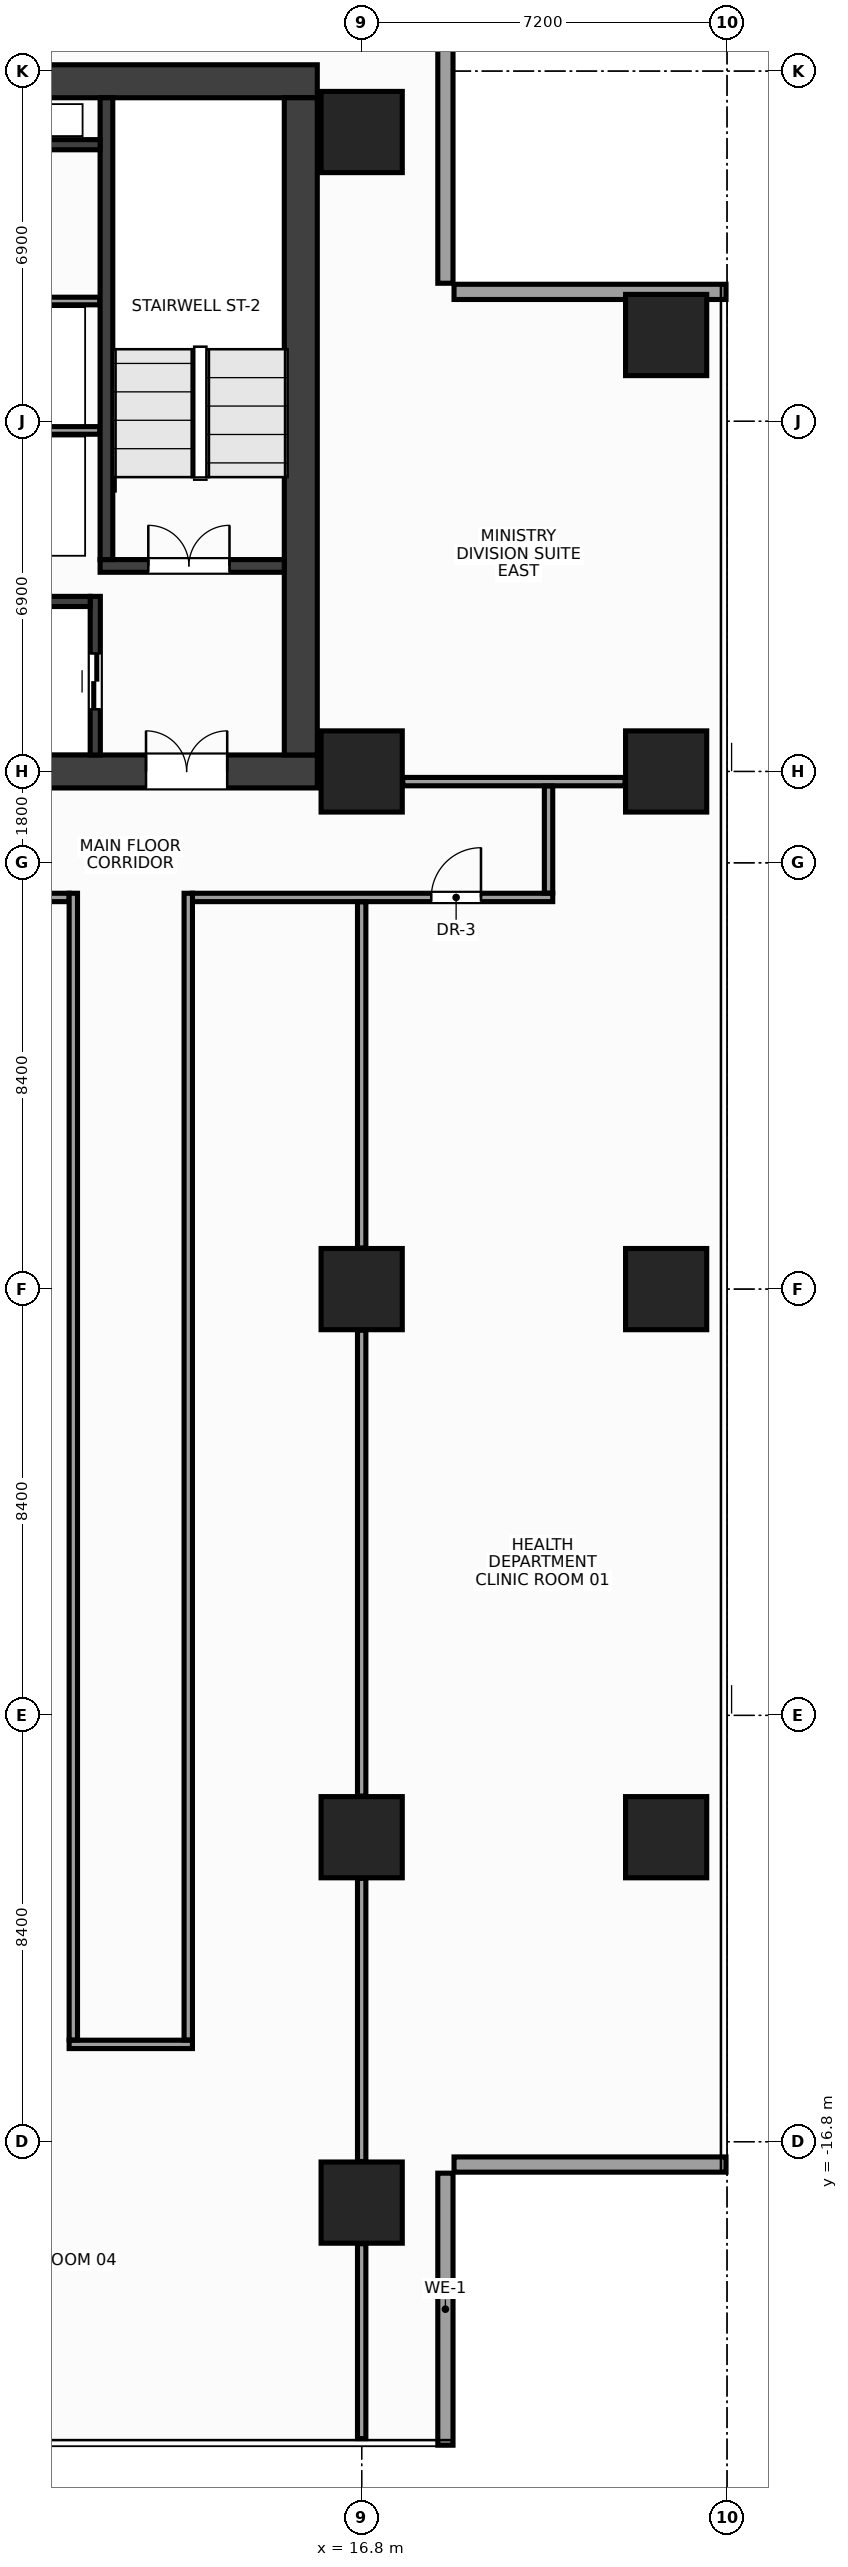
"""IFC4 building model, lengths in metres.
Left out: names, types, materials, properties, quantities, classifications, styles, units other than length and angle.
Written with IfcOpenShell. Run it as: python <this file> out.ifc"""

import sys

from ifc_helpers import new_model, si_unit, direction, frame, frame_2d, origin, origin_2d, place, context, subcontext, project, spatial, rectangle, extrude, source, transform, mapped, element, fill, save


model = new_model("IFC4")
c1 = context("Model", 3, precision=1e-05, world=origin(), true_north=direction((0.0, 1.0)))
c2 = subcontext(c1, "Body", "Model", "MODEL_VIEW")
j1 = project(units=[si_unit("LENGTHUNIT", "METRE"), si_unit("PLANEANGLEUNIT", "RADIAN")], contexts=[c1])
p1 = place(None, origin())
s1 = spatial("IfcSite", under=j1, at=p1, CompositionType="ELEMENT")
p2 = place(p1, origin())
s2 = spatial("IfcBuilding", under=s1, at=p2, CompositionType="ELEMENT")
p3 = place(p2, frame((0.0, 0.0, 160.4)))
s3 = spatial("IfcBuildingStorey", under=s2, at=p3, CompositionType="ELEMENT", Elevation=160.4)
m1 = source(origin(), c2, "Body", "SweptSolid", [
    extrude(rectangle(XDim=31.85, YDim=0.65, at=frame_2d((15.925, 0.0))), origin(), (0.0, 0.0, 1.0), 3.6),
])
p4 = place(p3, frame((-15.925, 23.8, 0.0), z_axis=(0.0, 0.0, 1.0), x_axis=(1.0, 0.0, 0.0)))
e1 = element("IfcWall", 1, at=p4, inside=s3, PredefinedType="SHEAR", context=c2, shape_type="MappedRepresentation", body=[
    mapped(m1, transform((0.0, 0.0, 0.0), x_axis=(1.0, 0.0, 0.0), y_axis=(0.0, 1.0, 0.0), z_axis=(0.0, 0.0, 1.0), scale=1.0)),
])
p5 = place(p3, frame((-15.925, 10.2, 0.0), z_axis=(0.0, 0.0, 1.0), x_axis=(1.0, 0.0, 0.0)))
e2 = element("IfcWall", 2, at=p5, inside=s3, PredefinedType="SHEAR", context=c2, shape_type="MappedRepresentation", body=[
    mapped(m1, transform((0.0, 0.0, 0.0), x_axis=(1.0, 0.0, 0.0), y_axis=(0.0, 1.0, 0.0), z_axis=(0.0, 0.0, 1.0), scale=1.0)),
])
p6 = place(p5, frame((1.775, 0.0, 0.0)))
e3 = element("IfcOpeningElement", 3, at=p6, cuts=e2, PredefinedType="OPENING", context=c2, shape_type="SweptSolid", body=[
    extrude(rectangle(XDim=1.6, YDim=2.15, at=frame_2d((0.8, 1.075))), frame((0.0, 0.337, 0.0), z_axis=(0.0, -1.0, 0.0), x_axis=(1.0, 0.0, 0.0)), (0.0, 0.0, 1.0), 0.674),
])
p7 = place(p5, frame((28.475, 0.0, 0.0)))
e4 = element("IfcOpeningElement", 4, at=p7, cuts=e2, PredefinedType="OPENING", context=c2, shape_type="SweptSolid", body=[
    extrude(rectangle(XDim=1.6, YDim=2.15, at=frame_2d((0.8, 1.075))), frame((0.0, 0.337, 0.0), z_axis=(0.0, -1.0, 0.0), x_axis=(1.0, 0.0, 0.0)), (0.0, 0.0, 1.0), 0.674),
])
p8 = place(p5, frame((15.175, 0.0, 0.0)))
e5 = element("IfcOpeningElement", 5, at=p8, cuts=e2, PredefinedType="OPENING", context=c2, shape_type="SweptSolid", body=[
    extrude(rectangle(XDim=1.5, YDim=2.2, at=frame_2d((0.75, 1.1))), frame((0.0, 0.337, 0.0), z_axis=(0.0, -1.0, 0.0), x_axis=(1.0, 0.0, 0.0)), (0.0, 0.0, 1.0), 0.674),
])
m2 = source(origin(), c2, "Body", "SweptSolid", [
    extrude(rectangle(XDim=12.95, YDim=0.65, at=frame_2d((6.475, 0.0))), origin(), (0.0, 0.0, 1.0), 3.6),
])
p9 = place(p3, frame((15.6, 10.525, 0.0), z_axis=(0.0, 0.0, 1.0), x_axis=(0.0, 1.0, 0.0)))
e6 = element("IfcWall", 6, at=p9, inside=s3, PredefinedType="SHEAR", context=c2, shape_type="MappedRepresentation", body=[
    mapped(m2, transform((0.0, 0.0, 0.0), x_axis=(1.0, 0.0, 0.0), y_axis=(0.0, 1.0, 0.0), z_axis=(0.0, 0.0, 1.0), scale=1.0)),
])
m3 = source(origin(), c2, "Body", "SweptSolid", [
    extrude(rectangle(XDim=3.63, YDim=0.25, at=frame_2d((1.815, 0.0))), origin(), (0.0, 0.0, 1.0), 3.6),
])
p10 = place(p3, frame((11.645, 14.25, 0.0), z_axis=(0.0, 0.0, 1.0), x_axis=(1.0, 0.0, 0.0)))
e7 = element("IfcWall", 7, at=p10, inside=s3, PredefinedType="SHEAR", context=c2, shape_type="MappedRepresentation", body=[
    mapped(m3, transform((0.0, 0.0, 0.0), x_axis=(1.0, 0.0, 0.0), y_axis=(0.0, 1.0, 0.0), z_axis=(0.0, 0.0, 1.0), scale=1.0)),
])
p11 = place(p10, frame((0.95, 0.0, 0.0)))
e8 = element("IfcOpeningElement", 8, at=p11, cuts=e7, PredefinedType="OPENING", context=c2, shape_type="SweptSolid", body=[
    extrude(rectangle(XDim=1.6, YDim=2.15, at=frame_2d((0.8, 1.075))), frame((0.0, 0.137, 0.0), z_axis=(0.0, -1.0, 0.0), x_axis=(1.0, 0.0, 0.0)), (0.0, 0.0, 1.0), 0.274),
])
m4 = source(origin(), c2, "Body", "SweptSolid", [
    extrude(rectangle(XDim=9.1, YDim=0.25, at=frame_2d((4.55, 0.0))), origin(), (0.0, 0.0, 1.0), 3.6),
])
p12 = place(p3, frame((11.77, 14.375, 0.0), z_axis=(0.0, 0.0, 1.0), x_axis=(0.0, 1.0, 0.0)))
e9 = element("IfcWall", 9, at=p12, inside=s3, PredefinedType="SHEAR", context=c2, shape_type="MappedRepresentation", body=[
    mapped(m4, transform((0.0, 0.0, 0.0), x_axis=(1.0, 0.0, 0.0), y_axis=(0.0, 1.0, 0.0), z_axis=(0.0, 0.0, 1.0), scale=1.0)),
])
m5 = source(origin(), c2, "Body", "SweptSolid", [
    extrude(rectangle(XDim=3.125, YDim=0.2, at=frame_2d((1.562, 0.0))), origin(), (0.0, 0.0, 1.0), 3.6),
])
p13 = place(p3, frame((11.55, 10.525, 0.0), z_axis=(0.0, 0.0, 1.0), x_axis=(0.0, 1.0, 0.0)))
e10 = element("IfcWall", 10, at=p13, inside=s3, PredefinedType="SHEAR", context=c2, shape_type="MappedRepresentation", body=[
    mapped(m5, transform((0.0, 0.0, 0.0), x_axis=(1.0, 0.0, 0.0), y_axis=(0.0, 1.0, 0.0), z_axis=(0.0, 0.0, 1.0), scale=1.0)),
])
p14 = place(p13, frame((0.9, 0.0, 0.0)))
e11 = element("IfcOpeningElement", 11, at=p14, cuts=e10, PredefinedType="OPENING", context=c2, shape_type="SweptSolid", body=[
    extrude(rectangle(XDim=1.1, YDim=2.15, at=frame_2d((0.55, 1.075))), frame((0.0, 0.112, 0.0), z_axis=(0.0, -1.0, 0.0), x_axis=(1.0, 0.0, 0.0)), (0.0, 0.0, 1.0), 0.224),
])
m6 = source(origin(), c2, "Body", "SweptSolid", [
    extrude(rectangle(XDim=2.825, YDim=0.2, at=frame_2d((1.413, 0.0))), origin(), (0.0, 0.0, 1.0), 3.6),
])
p15 = place(p3, frame((8.625, 13.55, 0.0), z_axis=(0.0, 0.0, 1.0), x_axis=(1.0, 0.0, 0.0)))
e12 = element("IfcWall", 12, at=p15, inside=s3, PredefinedType="SHEAR", context=c2, shape_type="MappedRepresentation", body=[
    mapped(m6, transform((0.0, 0.0, 0.0), x_axis=(1.0, 0.0, 0.0), y_axis=(0.0, 1.0, 0.0), z_axis=(0.0, 0.0, 1.0), scale=1.0)),
])
m7 = source(origin(), c2, "Body", "SweptSolid", [
    extrude(rectangle(XDim=3.02, YDim=0.2, at=frame_2d((1.51, 0.0))), origin(), (0.0, 0.0, 1.0), 3.6),
])
p16 = place(p3, frame((8.625, 22.55, 0.0), z_axis=(0.0, 0.0, 1.0), x_axis=(1.0, 0.0, 0.0)))
e13 = element("IfcWall", 13, at=p16, inside=s3, PredefinedType="SHEAR", context=c2, shape_type="MappedRepresentation", body=[
    mapped(m7, transform((0.0, 0.0, 0.0), x_axis=(1.0, 0.0, 0.0), y_axis=(0.0, 1.0, 0.0), z_axis=(0.0, 0.0, 1.0), scale=1.0)),
])
m8 = source(origin(), c2, "Body", "SweptSolid", [
    extrude(rectangle(XDim=1.6, YDim=1.6, at=origin_2d()), origin(), (0.0, 0.0, 1.0), 3.6),
])
for number, where, z_axis, x_axis in (
    (14, (16.8, -18.0, 0.0), (0.0, 0.0, 1.0), (1.0, 0.0, 0.0)),
    (15, (16.8, -10.8, 0.0), (0.0, 0.0, 1.0), (1.0, 0.0, 0.0)),
    (16, (16.8, 0.0, 0.0), (0.0, 0.0, 1.0), (1.0, 0.0, 0.0)),
    (17, (16.8, 10.2, 0.0), (0.0, 0.0, 1.0), (1.0, 0.0, 0.0)),
    (18, (16.8, 22.8, 0.0), (0.0, 0.0, 1.0), (1.0, 0.0, 0.0)),
    (19, (22.8, -10.8, 0.0), (0.0, 0.0, 1.0), (1.0, 0.0, 0.0)),
    (20, (22.8, 0.0, 0.0), (0.0, 0.0, 1.0), (1.0, 0.0, 0.0)),
    (21, (22.8, 10.2, 0.0), (0.0, 0.0, 1.0), (1.0, 0.0, 0.0)),
    (22, (22.8, 18.8, 0.0), (0.0, 0.0, 1.0), (1.0, 0.0, 0.0)),
):
    element("IfcColumn", number, at=place(p3, frame(where, z_axis=z_axis, x_axis=x_axis)), inside=s3, PredefinedType="COLUMN", context=c2, shape_type="MappedRepresentation", body=[
        mapped(m8, transform((0.0, 0.0, 0.0), x_axis=(1.0, 0.0, 0.0), y_axis=(0.0, 1.0, 0.0), z_axis=(0.0, 0.0, 1.0), scale=1.0)),
    ])
m9 = source(origin(), c2, "Body", "SweptSolid", [
    extrude(rectangle(XDim=5.36, YDim=0.3, at=frame_2d((2.68, 0.0))), origin(), (0.0, 0.0, 1.0), 2.76),
])
p17 = place(p3, frame((18.45, -22.78, 0.0), z_axis=(0.0, 0.0, 1.0), x_axis=(0.0, 1.0, 0.0)))
e23 = element("IfcWall", 23, at=p17, inside=s3, PredefinedType="STANDARD", context=c2, shape_type="MappedRepresentation", body=[
    mapped(m9, transform((0.0, 0.0, 0.0), x_axis=(1.0, 0.0, 0.0), y_axis=(0.0, 1.0, 0.0), z_axis=(0.0, 0.0, 1.0), scale=1.0)),
])
m10 = source(origin(), c2, "Body", "SweptSolid", [
    extrude(rectangle(XDim=5.36, YDim=0.3, at=frame_2d((2.68, 0.0))), origin(), (0.0, 0.0, 1.0), 2.76),
])
for number, where, z_axis, x_axis in (
    (24, (18.62, -17.25, 0.0), (0.0, 0.0, 1.0), (1.0, 0.0, 0.0)),
    (25, (23.98, 19.65, 0.0), (0.0, 0.0, 1.0), (-1.0, 0.0, 0.0)),
    (26, (18.45, 19.82, 0.0), (0.0, 0.0, 1.0), (0.0, 1.0, 0.0)),
):
    element("IfcWall", number, at=place(p3, frame(where, z_axis=z_axis, x_axis=x_axis)), inside=s3, PredefinedType="STANDARD", context=c2, shape_type="MappedRepresentation", body=[
        mapped(m10, transform((0.0, 0.0, 0.0), x_axis=(1.0, 0.0, 0.0), y_axis=(0.0, 1.0, 0.0), z_axis=(0.0, 0.0, 1.0), scale=1.0)),
    ])
m11 = source(origin(), c2, "Body", "SweptSolid", [
    extrude(rectangle(XDim=3.01, YDim=0.15, at=frame_2d((1.505, 0.0))), origin(), (0.0, 0.0, 1.0), 3.38),
])
for number, where, z_axis, x_axis in (
    (27, (8.63, 16.92, 0.0), (0.0, 0.0, 1.0), (1.0, 0.0, 0.0)),
    (28, (8.63, 19.47, 0.0), (0.0, 0.0, 1.0), (1.0, 0.0, 0.0)),
):
    element("IfcWall", number, at=place(p3, frame(where, z_axis=z_axis, x_axis=x_axis)), inside=s3, PredefinedType="PARTITIONING", context=c2, shape_type="MappedRepresentation", body=[
        mapped(m11, transform((0.0, 0.0, 0.0), x_axis=(1.0, 0.0, 0.0), y_axis=(0.0, 1.0, 0.0), z_axis=(0.0, 0.0, 1.0), scale=1.0)),
    ])
m12 = source(origin(), c2, "Body", "SweptSolid", [
    extrude(rectangle(XDim=4.38, YDim=0.165, at=frame_2d((2.19, 0.0))), origin(), (0.0, 0.0, 1.0), 2.915),
])
p18 = place(p3, frame((17.61, 10.0, 0.0), z_axis=(0.0, 0.0, 1.0), x_axis=(1.0, 0.0, 0.0)))
e29 = element("IfcWall", 29, at=p18, inside=s3, PredefinedType="PARTITIONING", context=c2, shape_type="MappedRepresentation", body=[
    mapped(m12, transform((0.0, 0.0, 0.0), x_axis=(1.0, 0.0, 0.0), y_axis=(0.0, 1.0, 0.0), z_axis=(0.0, 0.0, 1.0), scale=1.0)),
])
m13 = source(origin(), c2, "Body", "SweptSolid", [
    extrude(rectangle(XDim=31.6, YDim=0.165, at=frame_2d((15.8, 0.0))), origin(), (0.0, 0.0, 1.0), 2.765),
])
p19 = place(p3, frame((-20.565, 7.718, 0.0), z_axis=(0.0, 0.0, 1.0), x_axis=(1.0, 0.0, 0.0)))
e30 = element("IfcWall", 30, at=p19, inside=s3, PredefinedType="PARTITIONING", context=c2, shape_type="MappedRepresentation", body=[
    mapped(m13, transform((0.0, 0.0, 0.0), x_axis=(1.0, 0.0, 0.0), y_axis=(0.0, 1.0, 0.0), z_axis=(0.0, 0.0, 1.0), scale=1.0)),
])
p20 = place(p19, frame((2.614, 0.0, 0.0)))
e31 = element("IfcOpeningElement", 31, at=p20, cuts=e30, PredefinedType="OPENING", context=c2, shape_type="SweptSolid", body=[
    extrude(rectangle(XDim=0.98, YDim=2.15, at=frame_2d((0.49, 1.075))), frame((0.0, 0.094, 0.0), z_axis=(0.0, -1.0, 0.0), x_axis=(1.0, 0.0, 0.0)), (0.0, 0.0, 1.0), 0.189),
])
p21 = place(p19, frame((15.175, 0.0, 0.0)))
e32 = element("IfcOpeningElement", 32, at=p21, cuts=e30, PredefinedType="OPENING", context=c2, shape_type="SweptSolid", body=[
    extrude(rectangle(XDim=0.98, YDim=2.15, at=frame_2d((0.49, 1.075))), frame((0.0, 0.094, 0.0), z_axis=(0.0, -1.0, 0.0), x_axis=(1.0, 0.0, 0.0)), (0.0, 0.0, 1.0), 0.189),
])
p22 = place(p19, frame((27.874, 0.0, 0.0)))
e33 = element("IfcOpeningElement", 33, at=p22, cuts=e30, PredefinedType="OPENING", context=c2, shape_type="SweptSolid", body=[
    extrude(rectangle(XDim=0.98, YDim=2.15, at=frame_2d((0.49, 1.075))), frame((0.0, 0.094, 0.0), z_axis=(0.0, -1.0, 0.0), x_axis=(1.0, 0.0, 0.0)), (0.0, 0.0, 1.0), 0.189),
])
m14 = source(origin(), c2, "Body", "SweptSolid", [
    extrude(rectangle(XDim=7.1, YDim=0.165, at=frame_2d((3.55, 0.0))), origin(), (0.0, 0.0, 1.0), 2.765),
])
p23 = place(p3, frame((13.465, 7.718, 0.0), z_axis=(0.0, 0.0, 1.0), x_axis=(1.0, 0.0, 0.0)))
e34 = element("IfcWall", 34, at=p23, inside=s3, PredefinedType="PARTITIONING", context=c2, shape_type="MappedRepresentation", body=[
    mapped(m14, transform((0.0, 0.0, 0.0), x_axis=(1.0, 0.0, 0.0), y_axis=(0.0, 1.0, 0.0), z_axis=(0.0, 0.0, 1.0), scale=1.0)),
])
p24 = place(p23, frame((4.706, 0.0, 0.0)))
e35 = element("IfcOpeningElement", 35, at=p24, cuts=e34, PredefinedType="OPENING", context=c2, shape_type="SweptSolid", body=[
    extrude(rectangle(XDim=0.98, YDim=2.15, at=frame_2d((0.49, 1.075))), frame((0.0, 0.094, 0.0), z_axis=(0.0, -1.0, 0.0), x_axis=(1.0, 0.0, 0.0)), (0.0, 0.0, 1.0), 0.189),
])
m15 = source(origin(), c2, "Body", "SweptSolid", [
    extrude(rectangle(XDim=2.43, YDim=0.165, at=frame_2d((1.215, 0.0))), origin(), (0.0, 0.0, 1.0), 3.38),
])
p25 = place(p3, frame((11.035, -14.883, 0.0), z_axis=(0.0, 0.0, 1.0), x_axis=(1.0, 0.0, 0.0)))
e36 = element("IfcWall", 36, at=p25, inside=s3, PredefinedType="PARTITIONING", context=c2, shape_type="MappedRepresentation", body=[
    mapped(m15, transform((0.0, 0.0, 0.0), x_axis=(1.0, 0.0, 0.0), y_axis=(0.0, 1.0, 0.0), z_axis=(0.0, 0.0, 1.0), scale=1.0)),
])
m16 = source(origin(), c2, "Body", "SweptSolid", [
    extrude(rectangle(XDim=2.108, YDim=0.165, at=frame_2d((1.054, 0.0))), origin(), (0.0, 0.0, 1.0), 3.38),
])
p26 = place(p3, frame((20.482, 7.805, 0.0), z_axis=(0.0, 0.0, 1.0), x_axis=(0.0, 1.0, 0.0)))
e37 = element("IfcWall", 37, at=p26, inside=s3, PredefinedType="PARTITIONING", context=c2, shape_type="MappedRepresentation", body=[
    mapped(m16, transform((0.0, 0.0, 0.0), x_axis=(1.0, 0.0, 0.0), y_axis=(0.0, 1.0, 0.0), z_axis=(0.0, 0.0, 1.0), scale=1.0)),
])
m17 = source(origin(), c2, "Body", "SweptSolid", [
    extrude(rectangle(XDim=22.595, YDim=0.165, at=frame_2d((11.297, 0.0))), origin(), (0.0, 0.0, 1.0), 2.665),
])
for number, where, z_axis, x_axis in (
    (38, (11.117, -14.795, 0.0), (0.0, 0.0, 1.0), (0.0, 1.0, 0.0)),
    (39, (13.383, -14.795, 0.0), (0.0, 0.0, 1.0), (0.0, 1.0, 0.0)),
):
    element("IfcWall", number, at=place(p3, frame(where, z_axis=z_axis, x_axis=x_axis)), inside=s3, PredefinedType="PARTITIONING", context=c2, shape_type="MappedRepresentation", body=[
        mapped(m17, transform((0.0, 0.0, 0.0), x_axis=(1.0, 0.0, 0.0), y_axis=(0.0, 1.0, 0.0), z_axis=(0.0, 0.0, 1.0), scale=1.0)),
    ])
m18 = source(origin(), c2, "Body", "SweptSolid", [
    extrude(rectangle(XDim=3.84, YDim=0.165, at=frame_2d((1.92, 0.0))), origin(), (0.0, 0.0, 1.0), 3.38),
])
p27 = place(p3, frame((16.8, -22.65, 0.0), z_axis=(0.0, 0.0, 1.0), x_axis=(0.0, 1.0, 0.0)))
e40 = element("IfcWall", 40, at=p27, inside=s3, PredefinedType="PARTITIONING", context=c2, shape_type="MappedRepresentation", body=[
    mapped(m18, transform((0.0, 0.0, 0.0), x_axis=(1.0, 0.0, 0.0), y_axis=(0.0, 1.0, 0.0), z_axis=(0.0, 0.0, 1.0), scale=1.0)),
])
m19 = source(origin(), c2, "Body", "SweptSolid", [
    extrude(rectangle(XDim=5.58, YDim=0.165, at=frame_2d((2.79, 0.0))), origin(), (0.0, 0.0, 1.0), 2.965),
])
p28 = place(p3, frame((16.8, -17.19, 0.0), z_axis=(0.0, 0.0, 1.0), x_axis=(0.0, 1.0, 0.0)))
e41 = element("IfcWall", 41, at=p28, inside=s3, PredefinedType="PARTITIONING", context=c2, shape_type="MappedRepresentation", body=[
    mapped(m19, transform((0.0, 0.0, 0.0), x_axis=(1.0, 0.0, 0.0), y_axis=(0.0, 1.0, 0.0), z_axis=(0.0, 0.0, 1.0), scale=1.0)),
])
m20 = source(origin(), c2, "Body", "SweptSolid", [
    extrude(rectangle(XDim=9.18, YDim=0.165, at=frame_2d((4.59, 0.0))), origin(), (0.0, 0.0, 1.0), 2.765),
])
p29 = place(p3, frame((16.8, -9.99, 0.0), z_axis=(0.0, 0.0, 1.0), x_axis=(0.0, 1.0, 0.0)))
e42 = element("IfcWall", 42, at=p29, inside=s3, PredefinedType="PARTITIONING", context=c2, shape_type="MappedRepresentation", body=[
    mapped(m20, transform((0.0, 0.0, 0.0), x_axis=(1.0, 0.0, 0.0), y_axis=(0.0, 1.0, 0.0), z_axis=(0.0, 0.0, 1.0), scale=1.0)),
])
m21 = source(origin(), c2, "Body", "SweptSolid", [
    extrude(rectangle(XDim=6.82, YDim=0.165, at=frame_2d((3.41, 0.0))), origin(), (0.0, 0.0, 1.0), 2.765),
])
p30 = place(p3, frame((16.8, 0.81, 0.0), z_axis=(0.0, 0.0, 1.0), x_axis=(0.0, 1.0, 0.0)))
e43 = element("IfcWall", 43, at=p30, inside=s3, PredefinedType="PARTITIONING", context=c2, shape_type="MappedRepresentation", body=[
    mapped(m21, transform((0.0, 0.0, 0.0), x_axis=(1.0, 0.0, 0.0), y_axis=(0.0, 1.0, 0.0), z_axis=(0.0, 0.0, 1.0), scale=1.0)),
])
m22 = source(origin(), c2, "Body", "SweptSolid", [
    extrude(rectangle(XDim=1.6, YDim=2.15, at=frame_2d((0.8, 1.075))), frame((0.0, 0.025, 0.0), z_axis=(0.0, -1.0, 0.0), x_axis=(1.0, 0.0, 0.0)), (0.0, 0.0, 1.0), 0.05),
])
p31 = place(p11, origin())
e44 = element("IfcDoor", 44, at=p31, inside=s3, OperationType="DOUBLE_DOOR_SINGLE_SWING", PredefinedType="DOOR", context=c2, shape_type="MappedRepresentation", body=[
    mapped(m22, transform((0.0, 0.0, 0.0), x_axis=(1.0, 0.0, 0.0), y_axis=(0.0, 1.0, 0.0), z_axis=(0.0, 0.0, 1.0), scale=1.0)),
])
fill(e8, e44)
p32 = place(p7, origin())
e45 = element("IfcDoor", 45, at=p32, inside=s3, OperationType="DOUBLE_DOOR_SINGLE_SWING", PredefinedType="DOOR", context=c2, shape_type="MappedRepresentation", body=[
    mapped(m22, transform((0.0, 0.0, 0.0), x_axis=(1.0, 0.0, 0.0), y_axis=(0.0, 1.0, 0.0), z_axis=(0.0, 0.0, 1.0), scale=1.0)),
])
fill(e4, e45)
m23 = source(origin(), c2, "Body", "SweptSolid", [
    extrude(rectangle(XDim=1.1, YDim=2.15, at=frame_2d((0.55, 1.075))), frame((0.0, 0.025, 0.0), z_axis=(0.0, -1.0, 0.0), x_axis=(1.0, 0.0, 0.0)), (0.0, 0.0, 1.0), 0.05),
])
p33 = place(p14, origin())
e46 = element("IfcDoor", 46, at=p33, inside=s3, OperationType="DOUBLE_DOOR_SLIDING", PredefinedType="DOOR", context=c2, shape_type="MappedRepresentation", body=[
    mapped(m23, transform((0.0, 0.0, 0.0), x_axis=(1.0, 0.0, 0.0), y_axis=(0.0, 1.0, 0.0), z_axis=(0.0, 0.0, 1.0), scale=1.0)),
])
fill(e11, e46)
m24 = source(origin(), c2, "Body", "SweptSolid", [
    extrude(rectangle(XDim=0.98, YDim=2.15, at=frame_2d((0.49, 1.075))), frame((0.0, 0.025, 0.0), z_axis=(0.0, -1.0, 0.0), x_axis=(1.0, 0.0, 0.0)), (0.0, 0.0, 1.0), 0.05),
])
p34 = place(p24, origin())
e47 = element("IfcDoor", 47, at=p34, inside=s3, OperationType="SINGLE_SWING_RIGHT", PredefinedType="DOOR", context=c2, shape_type="MappedRepresentation", body=[
    mapped(m24, transform((0.0, 0.0, 0.0), x_axis=(1.0, 0.0, 0.0), y_axis=(0.0, 1.0, 0.0), z_axis=(0.0, 0.0, 1.0), scale=1.0)),
])
fill(e35, e47)
save(model, sys.argv[1])
